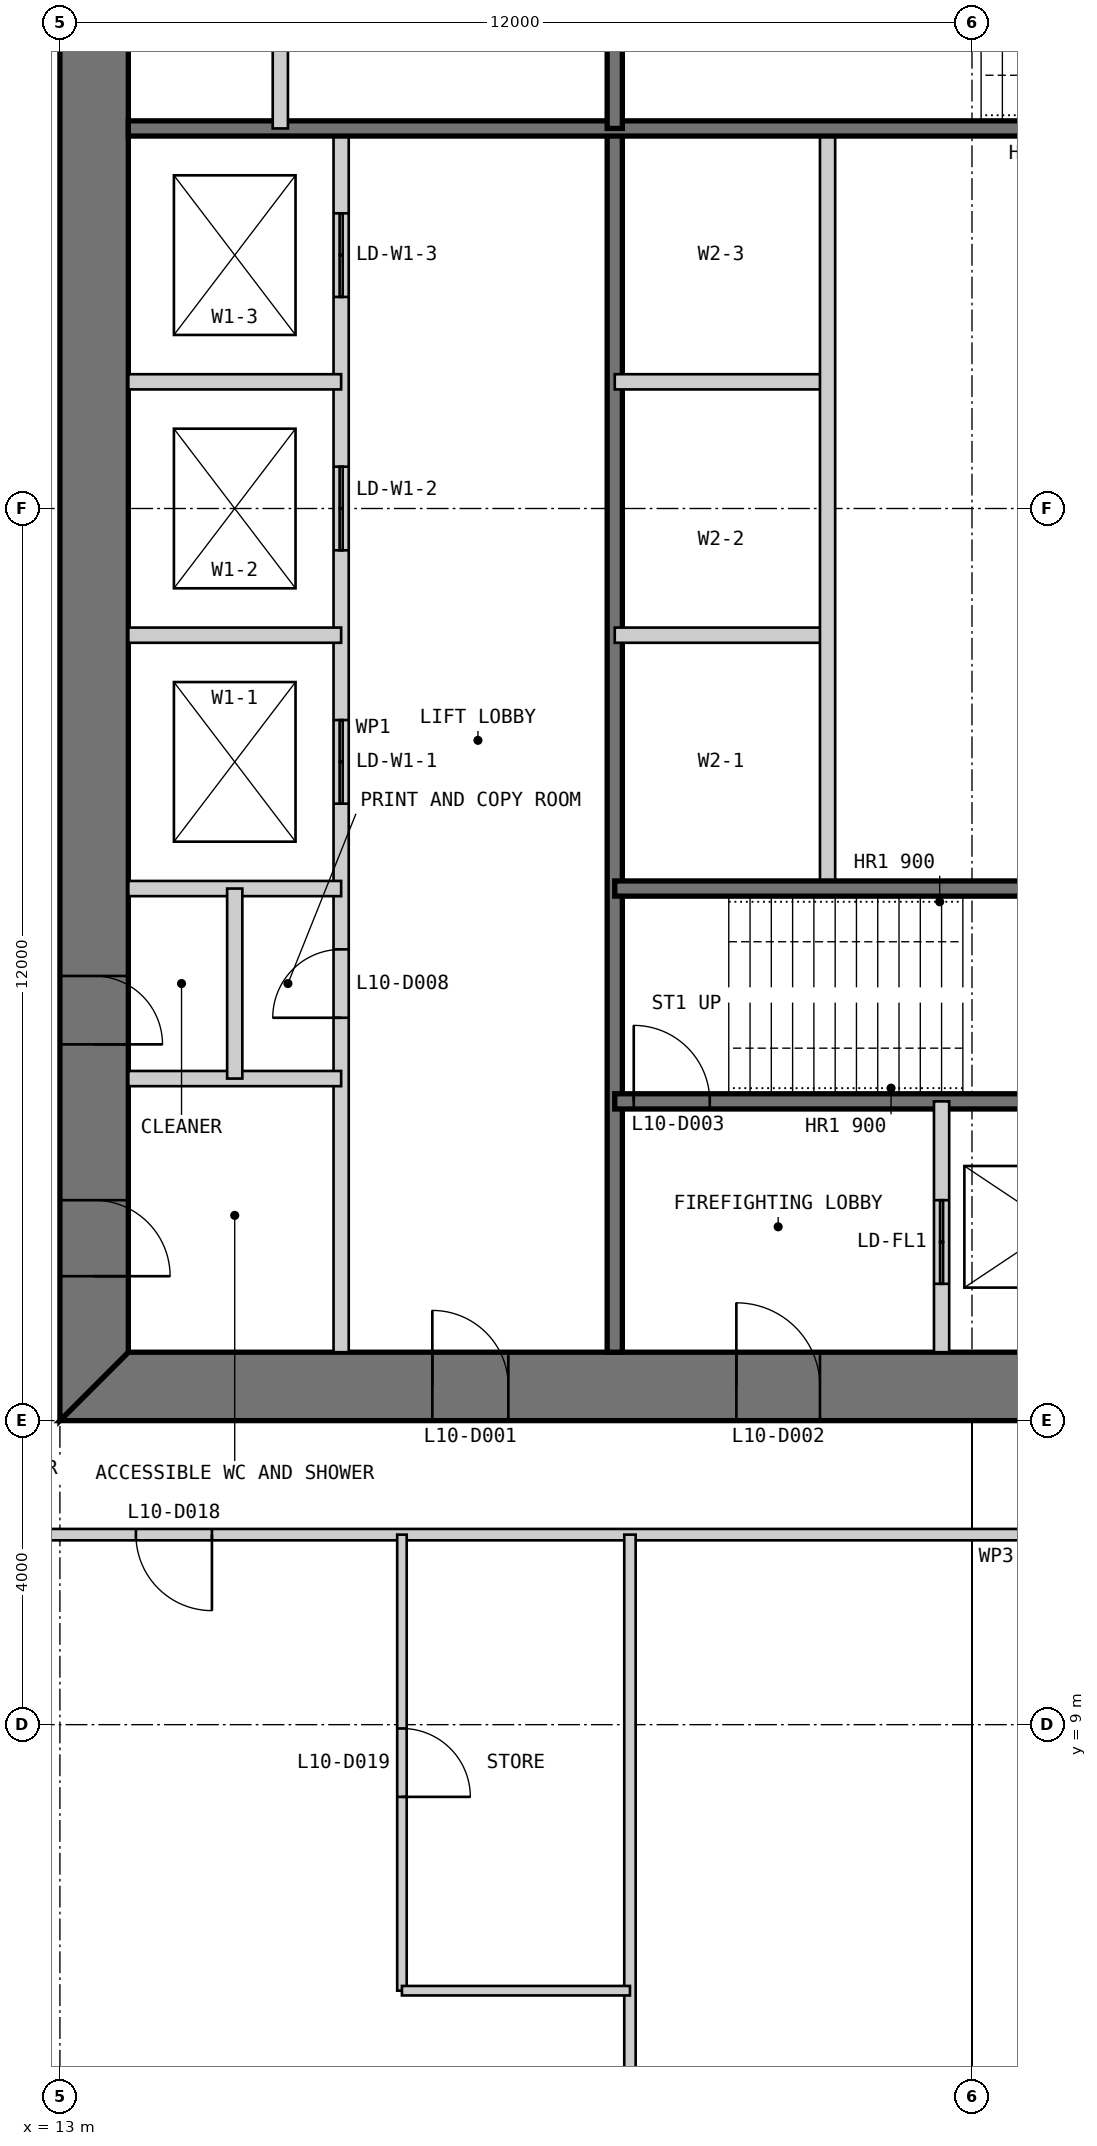
"""IFC4 building model, lengths in metres.
Left out: names, types, materials, properties, quantities, classifications, styles, units other than length and angle.
Written with IfcOpenShell. Run it as: python <this file> out.ifc"""

import sys

from ifc_helpers import new_model, si_unit, direction, frame, frame_2d, origin, place, context, subcontext, project, spatial, polyline, rectangle, outline, extrude, element, fill, save


model = new_model("IFC4")
c1 = context("Model", 3, precision=1e-05, world=origin(), true_north=direction((0.0, 1.0)))
c2 = subcontext(c1, "Body", "Model", "MODEL_VIEW")
j1 = project(units=[si_unit("LENGTHUNIT", "METRE"), si_unit("PLANEANGLEUNIT", "RADIAN")], contexts=[c1])
p1 = place(None, origin())
s1 = spatial("IfcSite", under=j1, at=p1, CompositionType="ELEMENT")
p2 = place(p1, origin())
s2 = spatial("IfcBuilding", under=s1, at=p2, CompositionType="ELEMENT")
p3 = place(p2, frame((0.0, 0.0, 47.0)))
s3 = spatial("IfcBuildingStorey", under=s2, at=p3, CompositionType="ELEMENT", Elevation=47.0)
p4 = place(p3, frame((13.0, 13.45, 0.0), z_axis=(0.0, 0.0, 1.0), x_axis=(1.0, 0.0, 0.0)))
e1 = element("IfcWall", 1, at=p4, inside=s3, PredefinedType="SHEAR", context=c2, shape_type="SweptSolid", body=[
    extrude(outline(polyline([(0.0, -0.45), (24.0, -0.45), (23.1, 0.45), (0.9, 0.45), (0.0, -0.45)])), origin(), (0.0, 0.0, 1.0), 4.0),
])
p5 = place(p4, frame((4.9, 0.0, 0.0)))
e2 = element("IfcOpeningElement", 2, at=p5, cuts=e1, PredefinedType="OPENING", context=c2, shape_type="SweptSolid", body=[
    extrude(rectangle(XDim=1.0, YDim=2.2, at=frame_2d((0.5, 1.1))), frame((0.0, 0.46, 0.0), z_axis=(0.0, -1.0, 0.0), x_axis=(1.0, 0.0, 0.0)), (0.0, 0.0, 1.0), 0.92),
])
p6 = place(p4, frame((8.9, 0.0, 0.0)))
e3 = element("IfcOpeningElement", 3, at=p6, cuts=e1, PredefinedType="OPENING", context=c2, shape_type="SweptSolid", body=[
    extrude(rectangle(XDim=1.1, YDim=2.2, at=frame_2d((0.55, 1.1))), frame((0.0, 0.46, 0.0), z_axis=(0.0, -1.0, 0.0), x_axis=(1.0, 0.0, 0.0)), (0.0, 0.0, 1.0), 0.92),
])
p7 = place(p4, frame((15.05, 0.0, 0.0)))
e4 = element("IfcOpeningElement", 4, at=p7, cuts=e1, PredefinedType="OPENING", context=c2, shape_type="SweptSolid", body=[
    extrude(rectangle(XDim=0.9, YDim=2.2, at=frame_2d((0.45, 1.1))), frame((0.0, 0.46, 0.0), z_axis=(0.0, -1.0, 0.0), x_axis=(1.0, 0.0, 0.0)), (0.0, 0.0, 1.0), 0.92),
])
p8 = place(p4, frame((17.9, 0.0, 0.0)))
e5 = element("IfcOpeningElement", 5, at=p8, cuts=e1, PredefinedType="OPENING", context=c2, shape_type="SweptSolid", body=[
    extrude(rectangle(XDim=1.0, YDim=2.2, at=frame_2d((0.5, 1.1))), frame((0.0, 0.46, 0.0), z_axis=(0.0, -1.0, 0.0), x_axis=(1.0, 0.0, 0.0)), (0.0, 0.0, 1.0), 0.92),
])
p9 = place(p4, frame((21.4, 0.0, 0.0)))
e6 = element("IfcOpeningElement", 6, at=p9, cuts=e1, PredefinedType="OPENING", context=c2, shape_type="SweptSolid", body=[
    extrude(rectangle(XDim=1.0, YDim=2.2, at=frame_2d((0.5, 1.1))), frame((0.0, 0.46, 0.0), z_axis=(0.0, -1.0, 0.0), x_axis=(1.0, 0.0, 0.0)), (0.0, 0.0, 1.0), 0.92),
])
p10 = place(p3, frame((13.45, 36.1, 0.0), z_axis=(0.0, 0.0, 1.0), x_axis=(0.0, -1.0, 0.0)))
e7 = element("IfcWall", 7, at=p10, inside=s3, PredefinedType="SHEAR", context=c2, shape_type="SweptSolid", body=[
    extrude(outline(polyline([(-0.9, -0.45), (23.1, -0.45), (22.2, 0.45), (0.0, 0.45), (-0.9, -0.45)])), origin(), (0.0, 0.0, 1.0), 4.0),
])
p11 = place(p10, frame((20.2, 0.0, 0.0)))
e8 = element("IfcOpeningElement", 8, at=p11, cuts=e7, PredefinedType="OPENING", context=c2, shape_type="SweptSolid", body=[
    extrude(rectangle(XDim=1.0, YDim=2.2, at=frame_2d((0.5, 1.1))), frame((0.0, 0.46, 0.0), z_axis=(0.0, -1.0, 0.0), x_axis=(1.0, 0.0, 0.0)), (0.0, 0.0, 1.0), 0.92),
])
p12 = place(p10, frame((17.25, 0.0, 0.0)))
e9 = element("IfcOpeningElement", 9, at=p12, cuts=e7, PredefinedType="OPENING", context=c2, shape_type="SweptSolid", body=[
    extrude(rectangle(XDim=0.9, YDim=2.2, at=frame_2d((0.45, 1.1))), frame((0.0, 0.46, 0.0), z_axis=(0.0, -1.0, 0.0), x_axis=(1.0, 0.0, 0.0)), (0.0, 0.0, 1.0), 0.92),
])
p13 = place(p3, frame((16.7, 13.9, 0.0), z_axis=(0.0, 0.0, 1.0), x_axis=(0.0, 1.0, 0.0)))
e10 = element("IfcWall", 10, at=p13, inside=s3, PredefinedType="PARTITIONING", context=c2, shape_type="SweptSolid", body=[
    extrude(rectangle(XDim=16.1, YDim=0.2, at=frame_2d((8.05, 0.0))), origin(), (0.0, 0.0, 1.0), 3.8),
])
p14 = place(p13, frame((4.4, 0.0, 0.0)))
e11 = element("IfcOpeningElement", 11, at=p14, cuts=e10, PredefinedType="OPENING", context=c2, shape_type="SweptSolid", body=[
    extrude(rectangle(XDim=0.9, YDim=2.2, at=frame_2d((0.45, 1.1))), frame((0.0, 0.11, 0.0), z_axis=(0.0, -1.0, 0.0), x_axis=(1.0, 0.0, 0.0)), (0.0, 0.0, 1.0), 0.22),
])
p15 = place(p13, frame((7.217, 0.0, 0.0)))
e12 = element("IfcOpeningElement", 12, at=p15, cuts=e10, PredefinedType="OPENING", context=c2, shape_type="SweptSolid", body=[
    extrude(rectangle(XDim=1.1, YDim=2.2, at=frame_2d((0.55, 1.1))), frame((0.0, 0.11, 0.0), z_axis=(0.0, -1.0, 0.0), x_axis=(1.0, 0.0, 0.0)), (0.0, 0.0, 1.0), 0.22),
])
p16 = place(p13, frame((10.55, 0.0, 0.0)))
e13 = element("IfcOpeningElement", 13, at=p16, cuts=e10, PredefinedType="OPENING", context=c2, shape_type="SweptSolid", body=[
    extrude(rectangle(XDim=1.1, YDim=2.2, at=frame_2d((0.55, 1.1))), frame((0.0, 0.11, 0.0), z_axis=(0.0, -1.0, 0.0), x_axis=(1.0, 0.0, 0.0)), (0.0, 0.0, 1.0), 0.22),
])
p17 = place(p13, frame((13.883, 0.0, 0.0)))
e14 = element("IfcOpeningElement", 14, at=p17, cuts=e10, PredefinedType="OPENING", context=c2, shape_type="SweptSolid", body=[
    extrude(rectangle(XDim=1.1, YDim=2.2, at=frame_2d((0.55, 1.1))), frame((0.0, 0.11, 0.0), z_axis=(0.0, -1.0, 0.0), x_axis=(1.0, 0.0, 0.0)), (0.0, 0.0, 1.0), 0.22),
])
p18 = place(p3, frame((20.3, 13.9, 0.0), z_axis=(0.0, 0.0, 1.0), x_axis=(0.0, 1.0, 0.0)))
e15 = element("IfcWall", 15, at=p18, inside=s3, PredefinedType="SOLIDWALL", context=c2, shape_type="SweptSolid", body=[
    extrude(rectangle(XDim=16.1, YDim=0.2, at=frame_2d((8.05, 0.0))), origin(), (0.0, 0.0, 1.0), 3.8),
])
for number, where, z_axis, x_axis in (
    (16, (13.9, 20.0, 0.0), (0.0, 0.0, 1.0), (1.0, 0.0, 0.0)),
    (17, (13.9, 23.333, 0.0), (0.0, 0.0, 1.0), (1.0, 0.0, 0.0)),
    (18, (13.9, 26.667, 0.0), (0.0, 0.0, 1.0), (1.0, 0.0, 0.0)),
    (19, (20.3, 23.333, 0.0), (0.0, 0.0, 1.0), (1.0, 0.0, 0.0)),
    (20, (20.3, 26.667, 0.0), (0.0, 0.0, 1.0), (1.0, 0.0, 0.0)),
):
    element("IfcWall", number, at=place(p3, frame(where, z_axis=z_axis, x_axis=x_axis)), inside=s3, PredefinedType="PARTITIONING", context=c2, shape_type="SweptSolid", body=[
        extrude(rectangle(XDim=2.8, YDim=0.2, at=frame_2d((1.4, 0.0))), origin(), (0.0, 0.0, 1.0), 3.8),
    ])
p19 = place(p3, frame((23.1, 20.0, 0.0), z_axis=(0.0, 0.0, 1.0), x_axis=(0.0, 1.0, 0.0)))
e21 = element("IfcWall", 21, at=p19, inside=s3, PredefinedType="PARTITIONING", context=c2, shape_type="SweptSolid", body=[
    extrude(rectangle(XDim=10.0, YDim=0.2, at=frame_2d((5.0, 0.0))), origin(), (0.0, 0.0, 1.0), 3.8),
])
p20 = place(p3, frame((20.3, 17.2, 0.0), z_axis=(0.0, 0.0, 1.0), x_axis=(1.0, 0.0, 0.0)))
e22 = element("IfcWall", 22, at=p20, inside=s3, PredefinedType="SOLIDWALL", context=c2, shape_type="SweptSolid", body=[
    extrude(rectangle(XDim=9.4, YDim=0.2, at=frame_2d((4.7, 0.0))), origin(), (0.0, 0.0, 1.0), 3.8),
])
p21 = place(p20, frame((0.25, 0.0, 0.0)))
e23 = element("IfcOpeningElement", 23, at=p21, cuts=e22, PredefinedType="OPENING", context=c2, shape_type="SweptSolid", body=[
    extrude(rectangle(XDim=1.0, YDim=2.2, at=frame_2d((0.5, 1.1))), frame((0.0, 0.11, 0.0), z_axis=(0.0, -1.0, 0.0), x_axis=(1.0, 0.0, 0.0)), (0.0, 0.0, 1.0), 0.22),
])
p22 = place(p3, frame((20.3, 20.0, 0.0), z_axis=(0.0, 0.0, 1.0), x_axis=(1.0, 0.0, 0.0)))
e24 = element("IfcWall", 24, at=p22, inside=s3, PredefinedType="SOLIDWALL", context=c2, shape_type="SweptSolid", body=[
    extrude(rectangle(XDim=15.8, YDim=0.2, at=frame_2d((7.9, 0.0))), origin(), (0.0, 0.0, 1.0), 3.8),
])
p23 = place(p3, frame((24.6, 13.9, 0.0), z_axis=(0.0, 0.0, 1.0), x_axis=(0.0, 1.0, 0.0)))
e25 = element("IfcWall", 25, at=p23, inside=s3, PredefinedType="PARTITIONING", context=c2, shape_type="SweptSolid", body=[
    extrude(rectangle(XDim=3.3, YDim=0.2, at=frame_2d((1.65, 0.0))), origin(), (0.0, 0.0, 1.0), 3.8),
])
p24 = place(p23, frame((0.9, 0.0, 0.0)))
e26 = element("IfcOpeningElement", 26, at=p24, cuts=e25, PredefinedType="OPENING", context=c2, shape_type="SweptSolid", body=[
    extrude(rectangle(XDim=1.1, YDim=2.2, at=frame_2d((0.55, 1.1))), frame((0.0, 0.11, 0.0), z_axis=(0.0, -1.0, 0.0), x_axis=(1.0, 0.0, 0.0)), (0.0, 0.0, 1.0), 0.22),
])
p25 = place(p3, frame((13.9, 17.5, 0.0), z_axis=(0.0, 0.0, 1.0), x_axis=(1.0, 0.0, 0.0)))
e27 = element("IfcWall", 27, at=p25, inside=s3, PredefinedType="PARTITIONING", context=c2, shape_type="SweptSolid", body=[
    extrude(rectangle(XDim=2.8, YDim=0.2, at=frame_2d((1.4, 0.0))), origin(), (0.0, 0.0, 1.0), 3.8),
])
p26 = place(p3, frame((15.3, 17.5, 0.0), z_axis=(0.0, 0.0, 1.0), x_axis=(0.0, 1.0, 0.0)))
e28 = element("IfcWall", 28, at=p26, inside=s3, PredefinedType="PARTITIONING", context=c2, shape_type="SweptSolid", body=[
    extrude(rectangle(XDim=2.5, YDim=0.2, at=frame_2d((1.25, 0.0))), origin(), (0.0, 0.0, 1.0), 3.8),
])
p27 = place(p3, frame((29.7, 30.0, 0.0), z_axis=(0.0, 0.0, 1.0), x_axis=(-1.0, 0.0, 0.0)))
e29 = element("IfcWall", 29, at=p27, inside=s3, PredefinedType="SOLIDWALL", context=c2, shape_type="SweptSolid", body=[
    extrude(rectangle(XDim=15.8, YDim=0.2, at=frame_2d((7.9, 0.0))), origin(), (0.0, 0.0, 1.0), 3.8),
])
p28 = place(p3, frame((20.3, 36.1, 0.0), z_axis=(0.0, 0.0, 1.0), x_axis=(0.0, -1.0, 0.0)))
e30 = element("IfcWall", 30, at=p28, inside=s3, PredefinedType="SOLIDWALL", context=c2, shape_type="SweptSolid", body=[
    extrude(rectangle(XDim=6.1, YDim=0.2, at=frame_2d((3.05, 0.0))), origin(), (0.0, 0.0, 1.0), 3.8),
])
p29 = place(p3, frame((15.9, 36.1, 0.0), z_axis=(0.0, 0.0, 1.0), x_axis=(0.0, -1.0, 0.0)))
e31 = element("IfcWall", 31, at=p29, inside=s3, PredefinedType="PARTITIONING", context=c2, shape_type="SweptSolid", body=[
    extrude(rectangle(XDim=6.1, YDim=0.2, at=frame_2d((3.05, 0.0))), origin(), (0.0, 0.0, 1.0), 3.8),
])
p30 = place(p3, frame((11.5, 11.5, 0.0), z_axis=(0.0, 0.0, 1.0), x_axis=(1.0, 0.0, 0.0)))
e32 = element("IfcWall", 32, at=p30, inside=s3, PredefinedType="PARTITIONING", context=c2, shape_type="SweptSolid", body=[
    extrude(rectangle(XDim=27.0, YDim=0.15, at=frame_2d((13.5, 0.0))), origin(), (0.0, 0.0, 1.0), 3.85),
])
p31 = place(p30, frame((2.5, 0.0, 0.0)))
e33 = element("IfcOpeningElement", 33, at=p31, cuts=e32, PredefinedType="OPENING", context=c2, shape_type="SweptSolid", body=[
    extrude(rectangle(XDim=1.0, YDim=2.2, at=frame_2d((0.5, 1.1))), frame((0.0, 0.085, 0.0), z_axis=(0.0, -1.0, 0.0), x_axis=(1.0, 0.0, 0.0)), (0.0, 0.0, 1.0), 0.17),
])
p32 = place(p30, frame((16.0, 0.0, 0.0)))
e34 = element("IfcOpeningElement", 34, at=p32, cuts=e32, PredefinedType="OPENING", context=c2, shape_type="SweptSolid", body=[
    extrude(rectangle(XDim=1.0, YDim=2.2, at=frame_2d((0.5, 1.1))), frame((0.0, 0.085, 0.0), z_axis=(0.0, -1.0, 0.0), x_axis=(1.0, 0.0, 0.0)), (0.0, 0.0, 1.0), 0.17),
])
p33 = place(p3, frame((17.5, 5.5, 0.0), z_axis=(0.0, 0.0, 1.0), x_axis=(0.0, 1.0, 0.0)))
e35 = element("IfcWall", 35, at=p33, inside=s3, PredefinedType="PARTITIONING", context=c2, shape_type="SweptSolid", body=[
    extrude(rectangle(XDim=6.0, YDim=0.125, at=frame_2d((3.0, 0.0))), origin(), (0.0, 0.0, 1.0), 3.85),
])
p34 = place(p33, frame((2.55, 0.0, 0.0)))
e36 = element("IfcOpeningElement", 36, at=p34, cuts=e35, PredefinedType="OPENING", context=c2, shape_type="SweptSolid", body=[
    extrude(rectangle(XDim=0.9, YDim=2.2, at=frame_2d((0.45, 1.1))), frame((0.0, 0.073, 0.0), z_axis=(0.0, -1.0, 0.0), x_axis=(1.0, 0.0, 0.0)), (0.0, 0.0, 1.0), 0.145),
])
p35 = place(p3, frame((20.5, 0.15, 0.0), z_axis=(0.0, 0.0, 1.0), x_axis=(0.0, 1.0, 0.0)))
e37 = element("IfcWall", 37, at=p35, inside=s3, PredefinedType="PARTITIONING", context=c2, shape_type="SweptSolid", body=[
    extrude(rectangle(XDim=11.35, YDim=0.15, at=frame_2d((5.675, 0.0))), origin(), (0.0, 0.0, 1.0), 3.85),
])
p36 = place(p3, frame((17.5, 5.5, 0.0), z_axis=(0.0, 0.0, 1.0), x_axis=(1.0, 0.0, 0.0)))
e38 = element("IfcWall", 38, at=p36, inside=s3, PredefinedType="PARTITIONING", context=c2, shape_type="SweptSolid", body=[
    extrude(rectangle(XDim=3.0, YDim=0.125, at=frame_2d((1.5, 0.0))), origin(), (0.0, 0.0, 1.0), 3.85),
])
p37 = place(p5, origin())
e39 = element("IfcDoor", 39, at=p37, inside=s3, OperationType="SINGLE_SWING_LEFT", PredefinedType="DOOR", context=c2, shape_type="SweptSolid", body=[
    extrude(rectangle(XDim=1.0, YDim=2.2, at=frame_2d((0.5, 1.1))), frame((0.0, 0.025, 0.0), z_axis=(0.0, -1.0, 0.0), x_axis=(1.0, 0.0, 0.0)), (0.0, 0.0, 1.0), 0.05),
    extrude(outline(polyline([(0.0, 0.0), (0.04, 0.0), (0.04, 2.16), (0.96, 2.16), (0.96, 0.0), (1.0, 0.0), (1.0, 2.2), (0.0, 2.2), (0.0, 0.0)])), frame((0.0, 0.3, 0.0), z_axis=(0.0, -1.0, 0.0), x_axis=(1.0, 0.0, 0.0)), (0.0, 0.0, 1.0), 0.6),
])
fill(e2, e39)
p38 = place(p6, origin())
e40 = element("IfcDoor", 40, at=p38, inside=s3, OperationType="SINGLE_SWING_LEFT", PredefinedType="DOOR", context=c2, shape_type="SweptSolid", body=[
    extrude(rectangle(XDim=1.1, YDim=2.2, at=frame_2d((0.55, 1.1))), frame((0.0, 0.025, 0.0), z_axis=(0.0, -1.0, 0.0), x_axis=(1.0, 0.0, 0.0)), (0.0, 0.0, 1.0), 0.05),
    extrude(outline(polyline([(0.0, 0.0), (0.04, 0.0), (0.04, 2.16), (1.06, 2.16), (1.06, 0.0), (1.1, 0.0), (1.1, 2.2), (0.0, 2.2), (0.0, 0.0)])), frame((0.0, 0.3, 0.0), z_axis=(0.0, -1.0, 0.0), x_axis=(1.0, 0.0, 0.0)), (0.0, 0.0, 1.0), 0.6),
])
fill(e3, e40)
p39 = place(p21, origin())
e41 = element("IfcDoor", 41, at=p39, inside=s3, OperationType="SINGLE_SWING_LEFT", PredefinedType="DOOR", context=c2, shape_type="SweptSolid", body=[
    extrude(rectangle(XDim=1.0, YDim=2.2, at=frame_2d((0.5, 1.1))), frame((0.0, 0.025, 0.0), z_axis=(0.0, -1.0, 0.0), x_axis=(1.0, 0.0, 0.0)), (0.0, 0.0, 1.0), 0.05),
])
fill(e23, e41)
p40 = place(p11, origin())
e42 = element("IfcDoor", 42, at=p40, inside=s3, OperationType="SINGLE_SWING_RIGHT", PredefinedType="DOOR", context=c2, shape_type="SweptSolid", body=[
    extrude(rectangle(XDim=1.0, YDim=2.2, at=frame_2d((0.5, 1.1))), frame((0.0, 0.025, 0.0), z_axis=(0.0, -1.0, 0.0), x_axis=(1.0, 0.0, 0.0)), (0.0, 0.0, 1.0), 0.05),
    extrude(outline(polyline([(0.0, 0.0), (0.04, 0.0), (0.04, 2.16), (0.96, 2.16), (0.96, 0.0), (1.0, 0.0), (1.0, 2.2), (0.0, 2.2), (0.0, 0.0)])), frame((0.0, 0.3, 0.0), z_axis=(0.0, -1.0, 0.0), x_axis=(1.0, 0.0, 0.0)), (0.0, 0.0, 1.0), 0.6),
])
fill(e8, e42)
p41 = place(p14, origin())
e43 = element("IfcDoor", 43, at=p41, inside=s3, OperationType="SINGLE_SWING_LEFT", PredefinedType="DOOR", context=c2, shape_type="SweptSolid", body=[
    extrude(rectangle(XDim=0.9, YDim=2.2, at=frame_2d((0.45, 1.1))), frame((0.0, 0.025, 0.0), z_axis=(0.0, -1.0, 0.0), x_axis=(1.0, 0.0, 0.0)), (0.0, 0.0, 1.0), 0.05),
])
fill(e11, e43)
p42 = place(p12, origin())
e44 = element("IfcDoor", 44, at=p42, inside=s3, OperationType="SINGLE_SWING_RIGHT", PredefinedType="DOOR", context=c2, shape_type="SweptSolid", body=[
    extrude(rectangle(XDim=0.9, YDim=2.2, at=frame_2d((0.45, 1.1))), frame((0.0, 0.025, 0.0), z_axis=(0.0, -1.0, 0.0), x_axis=(1.0, 0.0, 0.0)), (0.0, 0.0, 1.0), 0.05),
    extrude(outline(polyline([(0.0, 0.0), (0.04, 0.0), (0.04, 2.16), (0.86, 2.16), (0.86, 0.0), (0.9, 0.0), (0.9, 2.2), (0.0, 2.2), (0.0, 0.0)])), frame((0.0, 0.3, 0.0), z_axis=(0.0, -1.0, 0.0), x_axis=(1.0, 0.0, 0.0)), (0.0, 0.0, 1.0), 0.6),
])
fill(e9, e44)
p43 = place(p31, frame((1.0, 0.0, 0.0), z_axis=(0.0, 0.0, 1.0), x_axis=(-1.0, 0.0, 0.0)))
e45 = element("IfcDoor", 45, at=p43, inside=s3, OperationType="SINGLE_SWING_LEFT", PredefinedType="DOOR", context=c2, shape_type="SweptSolid", body=[
    extrude(rectangle(XDim=1.0, YDim=2.2, at=frame_2d((0.5, 1.1))), frame((0.0, 0.025, 0.0), z_axis=(0.0, -1.0, 0.0), x_axis=(1.0, 0.0, 0.0)), (0.0, 0.0, 1.0), 0.05),
])
fill(e33, e45)
p44 = place(p34, frame((0.9, 0.0, 0.0), z_axis=(0.0, 0.0, 1.0), x_axis=(-1.0, 0.0, 0.0)))
e46 = element("IfcDoor", 46, at=p44, inside=s3, OperationType="SINGLE_SWING_RIGHT", PredefinedType="DOOR", context=c2, shape_type="SweptSolid", body=[
    extrude(rectangle(XDim=0.9, YDim=2.2, at=frame_2d((0.45, 1.1))), frame((0.0, 0.025, 0.0), z_axis=(0.0, -1.0, 0.0), x_axis=(1.0, 0.0, 0.0)), (0.0, 0.0, 1.0), 0.05),
])
fill(e36, e46)
p45 = place(p24, origin())
e47 = element("IfcDoor", 47, at=p45, inside=s3, OperationType="DOUBLE_DOOR_SLIDING", PredefinedType="DOOR", context=c2, shape_type="SweptSolid", body=[
    extrude(rectangle(XDim=1.1, YDim=2.2, at=frame_2d((0.55, 1.1))), frame((0.0, 0.025, 0.0), z_axis=(0.0, -1.0, 0.0), x_axis=(1.0, 0.0, 0.0)), (0.0, 0.0, 1.0), 0.05),
])
fill(e26, e47)
p46 = place(p15, origin())
e48 = element("IfcDoor", 48, at=p46, inside=s3, OperationType="DOUBLE_DOOR_SLIDING", PredefinedType="DOOR", context=c2, shape_type="SweptSolid", body=[
    extrude(rectangle(XDim=1.1, YDim=2.2, at=frame_2d((0.55, 1.1))), frame((0.0, 0.025, 0.0), z_axis=(0.0, -1.0, 0.0), x_axis=(1.0, 0.0, 0.0)), (0.0, 0.0, 1.0), 0.05),
])
fill(e12, e48)
p47 = place(p16, origin())
e49 = element("IfcDoor", 49, at=p47, inside=s3, OperationType="DOUBLE_DOOR_SLIDING", PredefinedType="DOOR", context=c2, shape_type="SweptSolid", body=[
    extrude(rectangle(XDim=1.1, YDim=2.2, at=frame_2d((0.55, 1.1))), frame((0.0, 0.025, 0.0), z_axis=(0.0, -1.0, 0.0), x_axis=(1.0, 0.0, 0.0)), (0.0, 0.0, 1.0), 0.05),
])
fill(e13, e49)
p48 = place(p17, origin())
e50 = element("IfcDoor", 50, at=p48, inside=s3, OperationType="DOUBLE_DOOR_SLIDING", PredefinedType="DOOR", context=c2, shape_type="SweptSolid", body=[
    extrude(rectangle(XDim=1.1, YDim=2.2, at=frame_2d((0.55, 1.1))), frame((0.0, 0.025, 0.0), z_axis=(0.0, -1.0, 0.0), x_axis=(1.0, 0.0, 0.0)), (0.0, 0.0, 1.0), 0.05),
])
fill(e14, e50)
save(model, sys.argv[1])
